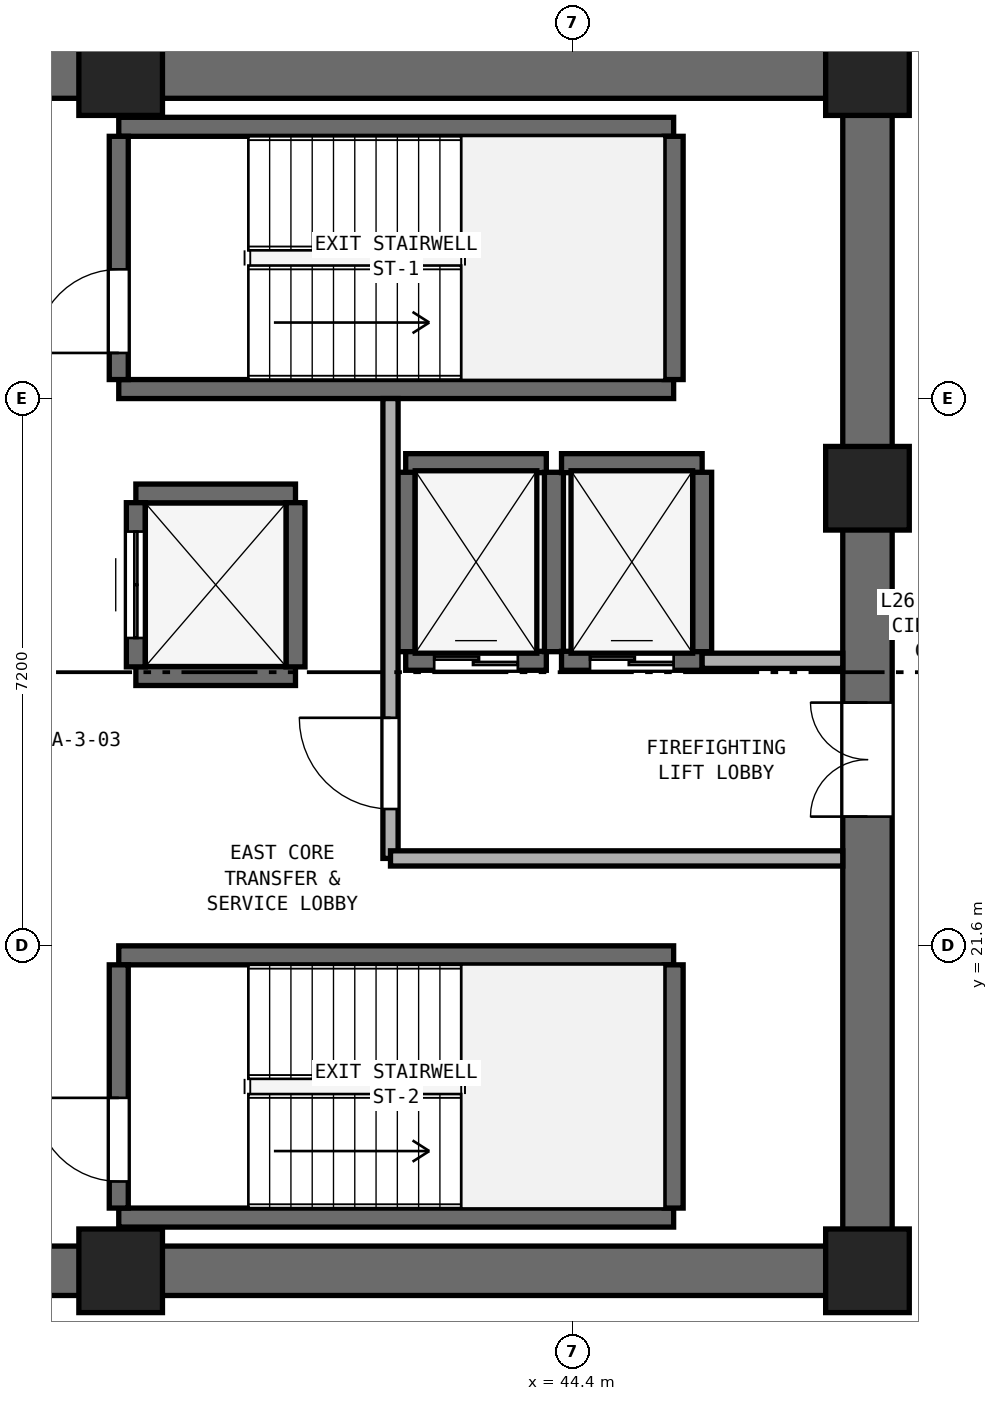
"""IFC4 building model, lengths in metres.
Left out: names, types, materials, properties, quantities, classifications, styles, units other than length and angle.
Written with IfcOpenShell. Run it as: python <this file> out.ifc"""

import sys

from ifc_helpers import new_model, si_unit, direction, frame, frame_2d, origin, origin_2d, place, context, subcontext, project, spatial, rectangle, extrude, element, fill, save


model = new_model("IFC4")
c1 = context("Model", 3, precision=1e-05, world=origin(), true_north=direction((0.0, 1.0)))
c2 = subcontext(c1, "Body", "Model", "MODEL_VIEW")
j1 = project(units=[si_unit("LENGTHUNIT", "METRE"), si_unit("PLANEANGLEUNIT", "RADIAN")], contexts=[c1])
p1 = place(None, origin())
s1 = spatial("IfcSite", under=j1, at=p1, CompositionType="ELEMENT")
p2 = place(p1, origin())
s2 = spatial("IfcBuilding", under=s1, at=p2, CompositionType="ELEMENT")
p3 = place(p2, frame((0.0, 0.0, 104.8)))
s3 = spatial("IfcBuildingStorey", under=s2, at=p3, CompositionType="ELEMENT", Elevation=104.8)
for number, where, z_axis, x_axis in (
    (1, (25.4, 17.325, 0.0), (0.0, 0.0, 1.0), (1.0, 0.0, 0.0)),
    (2, (25.4, 33.075, 0.0), (0.0, 0.0, 1.0), (1.0, 0.0, 0.0)),
):
    element("IfcWall", number, at=place(p3, frame(where, z_axis=z_axis, x_axis=x_axis)), inside=s3, PredefinedType="SHEAR", context=c2, shape_type="SweptSolid", body=[
        extrude(rectangle(XDim=23.2, YDim=0.65, at=frame_2d((11.6, 0.0))), origin(), (0.0, 0.0, 1.0), 3.525),
    ])
p4 = place(p3, frame((48.275, 17.65, 0.0), z_axis=(0.0, 0.0, 1.0), x_axis=(0.0, 1.0, 0.0)))
e3 = element("IfcWall", 3, at=p4, inside=s3, PredefinedType="SHEAR", context=c2, shape_type="SweptSolid", body=[
    extrude(rectangle(XDim=15.1, YDim=0.65, at=frame_2d((7.55, 0.0))), origin(), (0.0, 0.0, 1.0), 3.525),
])
p5 = place(p4, frame((5.65, 0.0, 0.0)))
e4 = element("IfcOpeningElement", 4, at=p5, cuts=e3, PredefinedType="OPENING", context=c2, shape_type="SweptSolid", body=[
    extrude(rectangle(XDim=1.5, YDim=2.15, at=frame_2d((0.75, 1.075))), frame((0.0, 0.335, 0.0), z_axis=(0.0, -1.0, 0.0), x_axis=(1.0, 0.0, 0.0)), (0.0, 0.0, 1.0), 0.67),
])
for number, where, z_axis, x_axis in (
    (5, (38.45, 17.325, 0.0), (0.0, 0.0, 1.0), (1.0, 0.0, 0.0)),
    (6, (48.275, 17.325, 0.0), (0.0, 0.0, 1.0), (1.0, 0.0, 0.0)),
    (7, (48.275, 27.62, 0.0), (0.0, 0.0, 1.0), (1.0, 0.0, 0.0)),
    (8, (48.275, 33.075, 0.0), (0.0, 0.0, 1.0), (1.0, 0.0, 0.0)),
    (9, (38.45, 33.075, 0.0), (0.0, 0.0, 1.0), (1.0, 0.0, 0.0)),
):
    element("IfcColumn", number, at=place(p3, frame(where, z_axis=z_axis, x_axis=x_axis)), inside=s3, PredefinedType="PILASTER", context=c2, shape_type="SweptSolid", body=[
        extrude(rectangle(XDim=1.1, YDim=1.1, at=origin_2d()), origin(), (0.0, 0.0, 1.0), 3.8),
    ])
for number, where, z_axis, x_axis in (
    (10, (38.425, 28.925, 0.0), (0.0, 0.0, 1.0), (1.0, 0.0, 0.0)),
    (11, (38.425, 32.375, 0.0), (0.0, 0.0, 1.0), (1.0, 0.0, 0.0)),
):
    element("IfcWall", number, at=place(p3, frame(where, z_axis=z_axis, x_axis=x_axis)), inside=s3, PredefinedType="SHEAR", context=c2, shape_type="SweptSolid", body=[
        extrude(rectangle(XDim=7.3, YDim=0.25, at=frame_2d((3.65, 0.0))), origin(), (0.0, 0.0, 1.0), 3.525),
    ])
p6 = place(p3, frame((38.425, 29.05, 0.0), z_axis=(0.0, 0.0, 1.0), x_axis=(0.0, 1.0, 0.0)))
e12 = element("IfcWall", 12, at=p6, inside=s3, PredefinedType="SHEAR", context=c2, shape_type="SweptSolid", body=[
    extrude(rectangle(XDim=3.2, YDim=0.25, at=frame_2d((1.6, 0.0))), origin(), (0.0, 0.0, 1.0), 3.525),
])
p7 = place(p6, frame((0.35, 0.0, 0.0)))
e13 = element("IfcOpeningElement", 13, at=p7, cuts=e12, PredefinedType="OPENING", context=c2, shape_type="SweptSolid", body=[
    extrude(rectangle(XDim=1.1, YDim=2.15, at=frame_2d((0.55, 1.075))), frame((0.0, 0.135, 0.0), z_axis=(0.0, -1.0, 0.0), x_axis=(1.0, 0.0, 0.0)), (0.0, 0.0, 1.0), 0.27),
])
p8 = place(p3, frame((45.725, 29.05, 0.0), z_axis=(0.0, 0.0, 1.0), x_axis=(0.0, 1.0, 0.0)))
e14 = element("IfcWall", 14, at=p8, inside=s3, PredefinedType="SHEAR", context=c2, shape_type="SweptSolid", body=[
    extrude(rectangle(XDim=3.2, YDim=0.25, at=frame_2d((1.6, 0.0))), origin(), (0.0, 0.0, 1.0), 3.525),
])
for number, where, z_axis, x_axis in (
    (15, (38.425, 18.025, 0.0), (0.0, 0.0, 1.0), (1.0, 0.0, 0.0)),
    (16, (38.425, 21.475, 0.0), (0.0, 0.0, 1.0), (1.0, 0.0, 0.0)),
):
    element("IfcWall", number, at=place(p3, frame(where, z_axis=z_axis, x_axis=x_axis)), inside=s3, PredefinedType="SHEAR", context=c2, shape_type="SweptSolid", body=[
        extrude(rectangle(XDim=7.3, YDim=0.25, at=frame_2d((3.65, 0.0))), origin(), (0.0, 0.0, 1.0), 3.525),
    ])
p9 = place(p3, frame((38.425, 18.15, 0.0), z_axis=(0.0, 0.0, 1.0), x_axis=(0.0, 1.0, 0.0)))
e17 = element("IfcWall", 17, at=p9, inside=s3, PredefinedType="SHEAR", context=c2, shape_type="SweptSolid", body=[
    extrude(rectangle(XDim=3.2, YDim=0.25, at=frame_2d((1.6, 0.0))), origin(), (0.0, 0.0, 1.0), 3.525),
])
p10 = place(p9, frame((0.35, 0.0, 0.0)))
e18 = element("IfcOpeningElement", 18, at=p10, cuts=e17, PredefinedType="OPENING", context=c2, shape_type="SweptSolid", body=[
    extrude(rectangle(XDim=1.1, YDim=2.15, at=frame_2d((0.55, 1.075))), frame((0.0, 0.135, 0.0), z_axis=(0.0, -1.0, 0.0), x_axis=(1.0, 0.0, 0.0)), (0.0, 0.0, 1.0), 0.27),
])
p11 = place(p3, frame((45.725, 18.15, 0.0), z_axis=(0.0, 0.0, 1.0), x_axis=(0.0, 1.0, 0.0)))
e19 = element("IfcWall", 19, at=p11, inside=s3, PredefinedType="SHEAR", context=c2, shape_type="SweptSolid", body=[
    extrude(rectangle(XDim=3.2, YDim=0.25, at=frame_2d((1.6, 0.0))), origin(), (0.0, 0.0, 1.0), 3.525),
])
p12 = place(p3, frame((42.2, 25.35, 0.0), z_axis=(0.0, 0.0, 1.0), x_axis=(1.0, 0.0, 0.0)))
e20 = element("IfcWall", 20, at=p12, inside=s3, PredefinedType="SHEAR", context=c2, shape_type="SweptSolid", body=[
    extrude(rectangle(XDim=1.85, YDim=0.25, at=frame_2d((0.925, 0.0))), origin(), (0.0, 0.0, 1.0), 3.525),
])
p13 = place(p12, frame((0.375, 0.0, 0.0)))
e21 = element("IfcOpeningElement", 21, at=p13, cuts=e20, PredefinedType="OPENING", context=c2, shape_type="SweptSolid", body=[
    extrude(rectangle(XDim=1.1, YDim=2.15, at=frame_2d((0.55, 1.075))), frame((0.0, 0.135, 0.0), z_axis=(0.0, -1.0, 0.0), x_axis=(1.0, 0.0, 0.0)), (0.0, 0.0, 1.0), 0.27),
])
p14 = place(p3, frame((42.2, 27.95, 0.0), z_axis=(0.0, 0.0, 1.0), x_axis=(1.0, 0.0, 0.0)))
e22 = element("IfcWall", 22, at=p14, inside=s3, PredefinedType="SHEAR", context=c2, shape_type="SweptSolid", body=[
    extrude(rectangle(XDim=1.85, YDim=0.25, at=frame_2d((0.925, 0.0))), origin(), (0.0, 0.0, 1.0), 3.525),
])
for number, where, z_axis, x_axis in (
    (23, (42.2, 25.47, 0.0), (0.0, 0.0, 1.0), (0.0, 1.0, 0.0)),
    (24, (44.15, 25.47, 0.0), (0.0, 0.0, 1.0), (0.0, 1.0, 0.0)),
):
    element("IfcWall", number, at=place(p3, frame(where, z_axis=z_axis, x_axis=x_axis)), inside=s3, PredefinedType="SHEAR", context=c2, shape_type="SweptSolid", body=[
        extrude(rectangle(XDim=2.36, YDim=0.25, at=frame_2d((1.18, 0.0))), origin(), (0.0, 0.0, 1.0), 3.525),
    ])
p15 = place(p3, frame((44.25, 25.35, 0.0), z_axis=(0.0, 0.0, 1.0), x_axis=(1.0, 0.0, 0.0)))
e25 = element("IfcWall", 25, at=p15, inside=s3, PredefinedType="SHEAR", context=c2, shape_type="SweptSolid", body=[
    extrude(rectangle(XDim=1.85, YDim=0.25, at=frame_2d((0.925, 0.0))), origin(), (0.0, 0.0, 1.0), 3.525),
])
p16 = place(p15, frame((0.375, 0.0, 0.0)))
e26 = element("IfcOpeningElement", 26, at=p16, cuts=e25, PredefinedType="OPENING", context=c2, shape_type="SweptSolid", body=[
    extrude(rectangle(XDim=1.1, YDim=2.15, at=frame_2d((0.55, 1.075))), frame((0.0, 0.135, 0.0), z_axis=(0.0, -1.0, 0.0), x_axis=(1.0, 0.0, 0.0)), (0.0, 0.0, 1.0), 0.27),
])
p17 = place(p3, frame((44.25, 27.95, 0.0), z_axis=(0.0, 0.0, 1.0), x_axis=(1.0, 0.0, 0.0)))
e27 = element("IfcWall", 27, at=p17, inside=s3, PredefinedType="SHEAR", context=c2, shape_type="SweptSolid", body=[
    extrude(rectangle(XDim=1.85, YDim=0.25, at=frame_2d((0.925, 0.0))), origin(), (0.0, 0.0, 1.0), 3.525),
])
p18 = place(p3, frame((46.1, 25.47, 0.0), z_axis=(0.0, 0.0, 1.0), x_axis=(0.0, 1.0, 0.0)))
e28 = element("IfcWall", 28, at=p18, inside=s3, PredefinedType="SHEAR", context=c2, shape_type="SweptSolid", body=[
    extrude(rectangle(XDim=2.36, YDim=0.25, at=frame_2d((1.18, 0.0))), origin(), (0.0, 0.0, 1.0), 3.525),
])
for number, where, z_axis, x_axis in (
    (29, (38.65, 25.15, 0.0), (0.0, 0.0, 1.0), (1.0, 0.0, 0.0)),
    (30, (38.65, 27.55, 0.0), (0.0, 0.0, 1.0), (1.0, 0.0, 0.0)),
):
    element("IfcWall", number, at=place(p3, frame(where, z_axis=z_axis, x_axis=x_axis)), inside=s3, PredefinedType="SHEAR", context=c2, shape_type="SweptSolid", body=[
        extrude(rectangle(XDim=2.1, YDim=0.25, at=frame_2d((1.05, 0.0))), origin(), (0.0, 0.0, 1.0), 3.525),
    ])
p19 = place(p3, frame((38.65, 25.27, 0.0), z_axis=(0.0, 0.0, 1.0), x_axis=(0.0, 1.0, 0.0)))
e31 = element("IfcWall", 31, at=p19, inside=s3, PredefinedType="SHEAR", context=c2, shape_type="SweptSolid", body=[
    extrude(rectangle(XDim=2.16, YDim=0.25, at=frame_2d((1.08, 0.0))), origin(), (0.0, 0.0, 1.0), 3.525),
])
p20 = place(p19, frame((0.38, 0.0, 0.0)))
e32 = element("IfcOpeningElement", 32, at=p20, cuts=e31, PredefinedType="OPENING", context=c2, shape_type="SweptSolid", body=[
    extrude(rectangle(XDim=1.4, YDim=2.2, at=frame_2d((0.7, 1.1))), frame((0.0, 0.135, 0.0), z_axis=(0.0, -1.0, 0.0), x_axis=(1.0, 0.0, 0.0)), (0.0, 0.0, 1.0), 0.27),
])
p21 = place(p3, frame((40.75, 25.27, 0.0), z_axis=(0.0, 0.0, 1.0), x_axis=(0.0, 1.0, 0.0)))
e33 = element("IfcWall", 33, at=p21, inside=s3, PredefinedType="SHEAR", context=c2, shape_type="SweptSolid", body=[
    extrude(rectangle(XDim=2.16, YDim=0.25, at=frame_2d((1.08, 0.0))), origin(), (0.0, 0.0, 1.0), 3.525),
])
p22 = place(p3, frame((42.0, 22.75, 0.0), z_axis=(0.0, 0.0, 1.0), x_axis=(0.0, 1.0, 0.0)))
e34 = element("IfcWall", 34, at=p22, inside=s3, PredefinedType="SOLIDWALL", context=c2, shape_type="SweptSolid", body=[
    extrude(rectangle(XDim=6.05, YDim=0.2, at=frame_2d((3.025, 0.0))), origin(), (0.0, 0.0, 1.0), 3.525),
])
p23 = place(p22, frame((0.65, 0.0, 0.0)))
e35 = element("IfcOpeningElement", 35, at=p23, cuts=e34, PredefinedType="OPENING", context=c2, shape_type="SweptSolid", body=[
    extrude(rectangle(XDim=1.2, YDim=2.15, at=frame_2d((0.6, 1.075))), frame((0.0, 0.11, 0.0), z_axis=(0.0, -1.0, 0.0), x_axis=(1.0, 0.0, 0.0)), (0.0, 0.0, 1.0), 0.22),
])
p24 = place(p3, frame((42.0, 22.75, 0.0), z_axis=(0.0, 0.0, 1.0), x_axis=(1.0, 0.0, 0.0)))
e36 = element("IfcWall", 36, at=p24, inside=s3, PredefinedType="SOLIDWALL", context=c2, shape_type="SweptSolid", body=[
    extrude(rectangle(XDim=5.95, YDim=0.2, at=frame_2d((2.975, 0.0))), origin(), (0.0, 0.0, 1.0), 3.525),
])
p25 = place(p3, frame((46.1, 25.35, 0.0), z_axis=(0.0, 0.0, 1.0), x_axis=(1.0, 0.0, 0.0)))
e37 = element("IfcWall", 37, at=p25, inside=s3, PredefinedType="SOLIDWALL", context=c2, shape_type="SweptSolid", body=[
    extrude(rectangle(XDim=1.85, YDim=0.2, at=frame_2d((0.925, 0.0))), origin(), (0.0, 0.0, 1.0), 3.525),
])
p26 = place(p7, origin())
e38 = element("IfcDoor", 38, at=p26, inside=s3, OperationType="SINGLE_SWING_LEFT", PredefinedType="DOOR", context=c2, shape_type="SweptSolid", body=[
    extrude(rectangle(XDim=1.1, YDim=2.15, at=frame_2d((0.55, 1.075))), frame((0.0, 0.025, 0.0), z_axis=(0.0, -1.0, 0.0), x_axis=(1.0, 0.0, 0.0)), (0.0, 0.0, 1.0), 0.05),
])
fill(e13, e38)
p27 = place(p10, origin())
e39 = element("IfcDoor", 39, at=p27, inside=s3, OperationType="SINGLE_SWING_RIGHT", PredefinedType="DOOR", context=c2, shape_type="SweptSolid", body=[
    extrude(rectangle(XDim=1.1, YDim=2.15, at=frame_2d((0.55, 1.075))), frame((0.0, 0.025, 0.0), z_axis=(0.0, -1.0, 0.0), x_axis=(1.0, 0.0, 0.0)), (0.0, 0.0, 1.0), 0.05),
])
fill(e18, e39)
p28 = place(p13, origin())
e40 = element("IfcDoor", 40, at=p28, inside=s3, OperationType="DOUBLE_DOOR_SLIDING", PredefinedType="DOOR", context=c2, shape_type="SweptSolid", body=[
    extrude(rectangle(XDim=1.1, YDim=2.15, at=frame_2d((0.55, 1.075))), frame((0.0, 0.025, 0.0), z_axis=(0.0, -1.0, 0.0), x_axis=(1.0, 0.0, 0.0)), (0.0, 0.0, 1.0), 0.05),
])
fill(e21, e40)
p29 = place(p16, origin())
e41 = element("IfcDoor", 41, at=p29, inside=s3, OperationType="DOUBLE_DOOR_SLIDING", PredefinedType="DOOR", context=c2, shape_type="SweptSolid", body=[
    extrude(rectangle(XDim=1.1, YDim=2.15, at=frame_2d((0.55, 1.075))), frame((0.0, 0.025, 0.0), z_axis=(0.0, -1.0, 0.0), x_axis=(1.0, 0.0, 0.0)), (0.0, 0.0, 1.0), 0.05),
])
fill(e26, e41)
p30 = place(p20, origin())
e42 = element("IfcDoor", 42, at=p30, inside=s3, OperationType="DOUBLE_DOOR_SLIDING", PredefinedType="DOOR", context=c2, shape_type="SweptSolid", body=[
    extrude(rectangle(XDim=1.4, YDim=2.2, at=frame_2d((0.7, 1.1))), frame((0.0, 0.025, 0.0), z_axis=(0.0, -1.0, 0.0), x_axis=(1.0, 0.0, 0.0)), (0.0, 0.0, 1.0), 0.05),
])
fill(e32, e42)
p31 = place(p23, origin())
e43 = element("IfcDoor", 43, at=p31, inside=s3, OperationType="SINGLE_SWING_RIGHT", PredefinedType="DOOR", context=c2, shape_type="SweptSolid", body=[
    extrude(rectangle(XDim=1.2, YDim=2.15, at=frame_2d((0.6, 1.075))), frame((0.0, 0.025, 0.0), z_axis=(0.0, -1.0, 0.0), x_axis=(1.0, 0.0, 0.0)), (0.0, 0.0, 1.0), 0.05),
])
fill(e35, e43)
p32 = place(p5, origin())
e44 = element("IfcDoor", 44, at=p32, inside=s3, OperationType="DOUBLE_DOOR_SINGLE_SWING", PredefinedType="DOOR", context=c2, shape_type="SweptSolid", body=[
    extrude(rectangle(XDim=1.5, YDim=2.15, at=frame_2d((0.75, 1.075))), frame((0.0, 0.025, 0.0), z_axis=(0.0, -1.0, 0.0), x_axis=(1.0, 0.0, 0.0)), (0.0, 0.0, 1.0), 0.05),
])
fill(e4, e44)
save(model, sys.argv[1])
